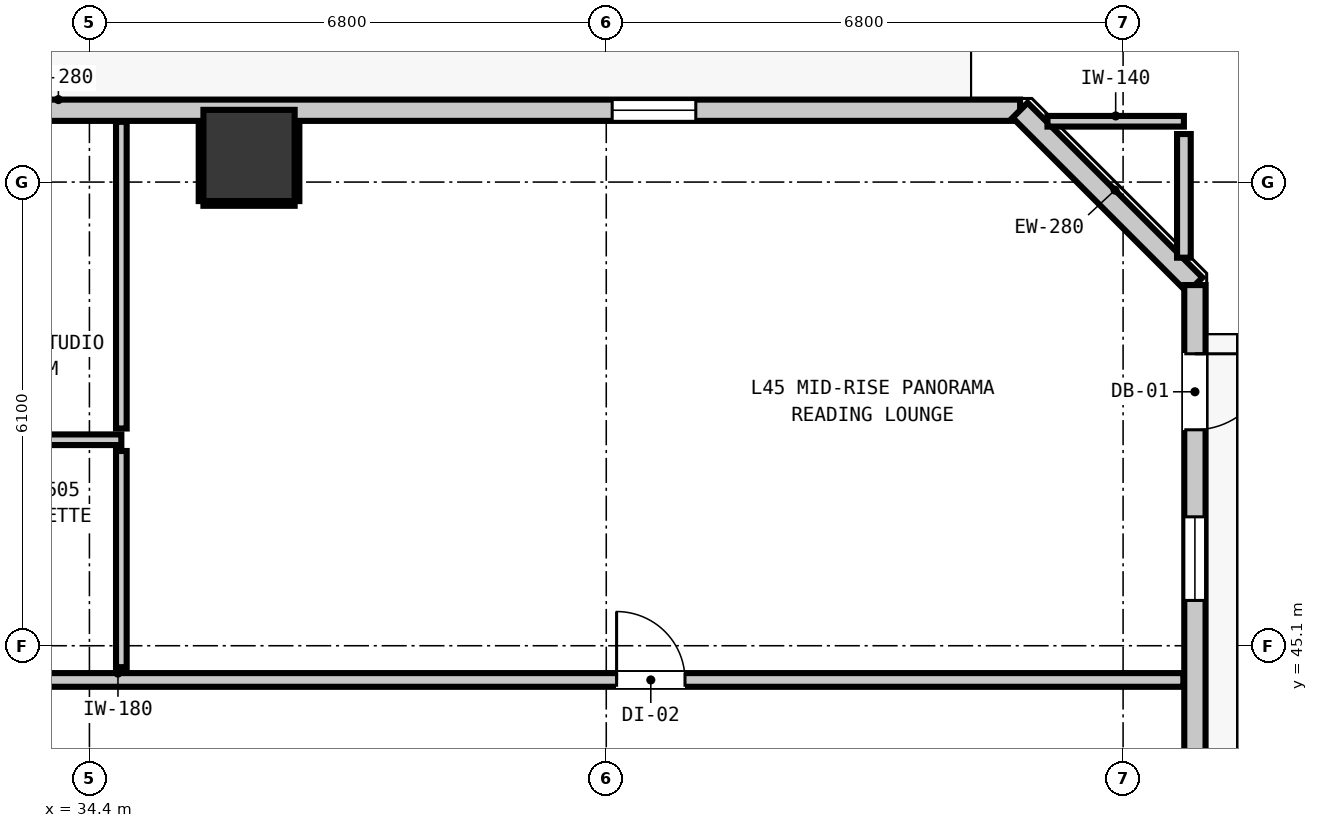
"""IFC4 building model, lengths in metres.
Left out: names, types, materials, properties, quantities, classifications, styles, units other than length and angle.
Written with IfcOpenShell. Run it as: python <this file> out.ifc"""

import sys

from ifc_helpers import new_model, si_unit, direction, frame, frame_2d, origin, origin_2d, place, context, subcontext, project, spatial, rectangle, extrude, element, fill, save


model = new_model("IFC4")
c1 = context("Model", 3, precision=1e-05, world=origin(), true_north=direction((0.0, 1.0)))
c2 = subcontext(c1, "Body", "Model", "MODEL_VIEW")
j1 = project(units=[si_unit("LENGTHUNIT", "METRE"), si_unit("PLANEANGLEUNIT", "RADIAN")], contexts=[c1])
p1 = place(None, origin())
s1 = spatial("IfcSite", under=j1, at=p1, CompositionType="ELEMENT")
p2 = place(p1, origin())
s2 = spatial("IfcBuilding", under=s1, at=p2, CompositionType="ELEMENT")
p3 = place(p2, frame((0.0, 0.0, 155.88)))
s3 = spatial("IfcBuildingStorey", under=s2, at=p3, CompositionType="ELEMENT", Elevation=155.88)
p4 = place(p3, frame((36.5, 51.55, 0.0), z_axis=(0.0, 0.0, 1.0), x_axis=(1.0, 0.0, 0.0)))
e1 = element("IfcColumn", 1, at=p4, inside=s3, PredefinedType="COLUMN", context=c2, shape_type="SweptSolid", body=[
    extrude(rectangle(XDim=1.2, YDim=1.2, at=origin_2d()), origin(), (0.0, 0.0, 1.0), 3.32),
])
p5 = place(p3, frame((11.555, 52.145, 0.0), z_axis=(0.0, 0.0, 1.0), x_axis=(1.0, 0.0, 0.0)))
e2 = element("IfcWall", 2, at=p5, inside=s3, PredefinedType="STANDARD", context=c2, shape_type="SweptSolid", body=[
    extrude(rectangle(XDim=35.09, YDim=0.28, at=frame_2d((17.545, 0.0))), origin(), (0.0, 0.0, 1.0), 3.08),
])
p6 = place(p5, frame((4.062, 0.0, 0.0)))
e3 = element("IfcOpeningElement", 3, at=p6, cuts=e2, PredefinedType="OPENING", context=c2, shape_type="SweptSolid", body=[
    extrude(rectangle(XDim=1.0, YDim=2.15, at=frame_2d((0.5, 1.075))), frame((0.0, 0.15, 0.0), z_axis=(0.0, -1.0, 0.0), x_axis=(1.0, 0.0, 0.0)), (0.0, 0.0, 1.0), 0.3),
])
p7 = place(p5, frame((5.863, 0.0, 0.85)))
e4 = element("IfcOpeningElement", 4, at=p7, cuts=e2, PredefinedType="OPENING", context=c2, shape_type="SweptSolid", body=[
    extrude(rectangle(XDim=1.1, YDim=2.05, at=frame_2d((0.55, 1.025))), frame((0.0, 0.15, 0.0), z_axis=(0.0, -1.0, 0.0), x_axis=(1.0, 0.0, 0.0)), (0.0, 0.0, 1.0), 0.3),
])
p8 = place(p5, frame((0.378, 0.0, 0.85)))
e5 = element("IfcOpeningElement", 5, at=p8, cuts=e2, PredefinedType="OPENING", context=c2, shape_type="SweptSolid", body=[
    extrude(rectangle(XDim=0.58, YDim=1.5, at=frame_2d((0.29, 0.75))), frame((0.0, 0.15, 0.0), z_axis=(0.0, -1.0, 0.0), x_axis=(1.0, 0.0, 0.0)), (0.0, 0.0, 1.0), 0.3),
])
p9 = place(p5, frame((14.05, 0.0, 0.85)))
e6 = element("IfcOpeningElement", 6, at=p9, cuts=e2, PredefinedType="OPENING", context=c2, shape_type="SweptSolid", body=[
    extrude(rectangle(XDim=1.1, YDim=2.05, at=frame_2d((0.55, 1.025))), frame((0.0, 0.15, 0.0), z_axis=(0.0, -1.0, 0.0), x_axis=(1.0, 0.0, 0.0)), (0.0, 0.0, 1.0), 0.3),
])
p10 = place(p5, frame((29.723, 0.0, 0.85)))
e7 = element("IfcOpeningElement", 7, at=p10, cuts=e2, PredefinedType="OPENING", context=c2, shape_type="SweptSolid", body=[
    extrude(rectangle(XDim=1.1, YDim=2.05, at=frame_2d((0.55, 1.025))), frame((0.0, 0.15, 0.0), z_axis=(0.0, -1.0, 0.0), x_axis=(1.0, 0.0, 0.0)), (0.0, 0.0, 1.0), 0.3),
])
p11 = place(p3, frame((46.645, 52.145, 0.0), z_axis=(0.0, 0.0, 1.0), x_axis=(0.707106781187, -0.707106781187, 0.0)))
e8 = element("IfcWall", 8, at=p11, inside=s3, PredefinedType="STANDARD", context=c2, shape_type="SweptSolid", body=[
    extrude(rectangle(XDim=3.253, YDim=0.28, at=frame_2d((1.626, 0.0))), origin(), (0.0, 0.0, 1.0), 3.08),
])
p12 = place(p3, frame((48.945, 49.845, 0.0), z_axis=(0.0, 0.0, 1.0), x_axis=(0.0, -1.0, 0.0)))
e9 = element("IfcWall", 9, at=p12, inside=s3, PredefinedType="STANDARD", context=c2, shape_type="SweptSolid", body=[
    extrude(rectangle(XDim=32.29, YDim=0.28, at=frame_2d((16.145, 0.0))), origin(), (0.0, 0.0, 1.0), 3.08),
])
p13 = place(p12, frame((0.904, 0.0, 0.0)))
e10 = element("IfcOpeningElement", 10, at=p13, cuts=e9, PredefinedType="OPENING", context=c2, shape_type="SweptSolid", body=[
    extrude(rectangle(XDim=1.0, YDim=2.15, at=frame_2d((0.5, 1.075))), frame((0.0, 0.15, 0.0), z_axis=(0.0, -1.0, 0.0), x_axis=(1.0, 0.0, 0.0)), (0.0, 0.0, 1.0), 0.3),
])
p14 = place(p12, frame((3.049, 0.0, 0.85)))
e11 = element("IfcOpeningElement", 11, at=p14, cuts=e9, PredefinedType="OPENING", context=c2, shape_type="SweptSolid", body=[
    extrude(rectangle(XDim=1.1, YDim=2.05, at=frame_2d((0.55, 1.025))), frame((0.0, 0.15, 0.0), z_axis=(0.0, -1.0, 0.0), x_axis=(1.0, 0.0, 0.0)), (0.0, 0.0, 1.0), 0.3),
])
p15 = place(p12, frame((21.311, 0.0, 0.85)))
e12 = element("IfcOpeningElement", 12, at=p15, cuts=e9, PredefinedType="OPENING", context=c2, shape_type="SweptSolid", body=[
    extrude(rectangle(XDim=1.1, YDim=2.05, at=frame_2d((0.55, 1.025))), frame((0.0, 0.15, 0.0), z_axis=(0.0, -1.0, 0.0), x_axis=(1.0, 0.0, 0.0)), (0.0, 0.0, 1.0), 0.3),
])
p16 = place(p12, frame((12.32, 0.0, 0.85)))
e13 = element("IfcOpeningElement", 13, at=p16, cuts=e9, PredefinedType="OPENING", context=c2, shape_type="SweptSolid", body=[
    extrude(rectangle(XDim=1.1, YDim=2.05, at=frame_2d((0.55, 1.025))), frame((0.0, 0.15, 0.0), z_axis=(0.0, -1.0, 0.0), x_axis=(1.0, 0.0, 0.0)), (0.0, 0.0, 1.0), 0.3),
])
p17 = place(p3, frame((9.407, 44.65, 0.0), z_axis=(0.0, 0.0, 1.0), x_axis=(1.0, 0.0, 0.0)))
e14 = element("IfcWall", 14, at=p17, inside=s3, PredefinedType="PARTITIONING", context=c2, shape_type="SweptSolid", body=[
    extrude(rectangle(XDim=39.386, YDim=0.18, at=frame_2d((19.693, 0.0))), origin(), (0.0, 0.0, 1.0), 3.08),
])
p18 = place(p17, frame((7.193, 0.0, 0.0)))
e15 = element("IfcOpeningElement", 15, at=p18, cuts=e14, PredefinedType="OPENING", context=c2, shape_type="SweptSolid", body=[
    extrude(rectangle(XDim=1.0, YDim=2.15, at=frame_2d((0.5, 1.075))), frame((0.0, 0.1, 0.0), z_axis=(0.0, -1.0, 0.0), x_axis=(1.0, 0.0, 0.0)), (0.0, 0.0, 1.0), 0.2),
])
p19 = place(p17, frame((17.808, 0.0, 0.0)))
e16 = element("IfcOpeningElement", 16, at=p19, cuts=e14, PredefinedType="OPENING", context=c2, shape_type="SweptSolid", body=[
    extrude(rectangle(XDim=1.0, YDim=2.15, at=frame_2d((0.5, 1.075))), frame((0.0, 0.1, 0.0), z_axis=(0.0, -1.0, 0.0), x_axis=(1.0, 0.0, 0.0)), (0.0, 0.0, 1.0), 0.2),
])
p20 = place(p17, frame((31.929, 0.0, 0.0)))
e17 = element("IfcOpeningElement", 17, at=p20, cuts=e14, PredefinedType="OPENING", context=c2, shape_type="SweptSolid", body=[
    extrude(rectangle(XDim=0.9, YDim=2.1, at=frame_2d((0.45, 1.05))), frame((0.0, 0.1, 0.0), z_axis=(0.0, -1.0, 0.0), x_axis=(1.0, 0.0, 0.0)), (0.0, 0.0, 1.0), 0.2),
])
p21 = place(p3, frame((31.82, 47.81, 0.0), z_axis=(0.0, 0.0, 1.0), x_axis=(1.0, 0.0, 0.0)))
e18 = element("IfcWall", 18, at=p21, inside=s3, PredefinedType="PARTITIONING", context=c2, shape_type="SweptSolid", body=[
    extrude(rectangle(XDim=3.0, YDim=0.14, at=frame_2d((1.5, 0.0))), origin(), (0.0, 0.0, 1.0), 3.08),
])
p22 = place(p3, frame((47.005, 52.0, 0.0), z_axis=(0.0, 0.0, 1.0), x_axis=(1.0, 0.0, 0.0)))
e19 = element("IfcWall", 19, at=p22, inside=s3, PredefinedType="PARTITIONING", context=c2, shape_type="SweptSolid", body=[
    extrude(rectangle(XDim=1.795, YDim=0.14, at=frame_2d((0.897, 0.0))), origin(), (0.0, 0.0, 1.0), 3.08),
])
p23 = place(p3, frame((48.8, 50.205, 0.0), z_axis=(0.0, 0.0, 1.0), x_axis=(0.0, 1.0, 0.0)))
e20 = element("IfcWall", 20, at=p23, inside=s3, PredefinedType="PARTITIONING", context=c2, shape_type="SweptSolid", body=[
    extrude(rectangle(XDim=1.627, YDim=0.18, at=frame_2d((0.813, 0.0))), origin(), (0.0, 0.0, 1.0), 3.08),
])
p24 = place(p3, frame((34.82, 44.818, 0.0), z_axis=(0.0, 0.0, 1.0), x_axis=(0.0, 1.0, 0.0)))
e21 = element("IfcWall", 21, at=p24, inside=s3, PredefinedType="PARTITIONING", context=c2, shape_type="SweptSolid", body=[
    extrude(rectangle(XDim=2.844, YDim=0.14, at=frame_2d((1.422, 0.0))), origin(), (0.0, 0.0, 1.0), 3.08),
])
p25 = place(p3, frame((34.82, 47.958, 0.0), z_axis=(0.0, 0.0, 1.0), x_axis=(0.0, 1.0, 0.0)))
e22 = element("IfcWall", 22, at=p25, inside=s3, PredefinedType="PARTITIONING", context=c2, shape_type="SweptSolid", body=[
    extrude(rectangle(XDim=4.035, YDim=0.14, at=frame_2d((2.018, 0.0))), origin(), (0.0, 0.0, 1.0), 3.08),
])
p26 = place(p3, frame((35.9, 50.918, 0.0), z_axis=(0.0, 0.0, 1.0), x_axis=(1.0, 0.0, 0.0)))
e23 = element("IfcWall", 23, at=p26, inside=s3, PredefinedType="PARTITIONING", context=c2, shape_type="SweptSolid", body=[
    extrude(rectangle(XDim=1.2, YDim=0.06, at=frame_2d((0.6, 0.0))), origin(), (0.0, 0.0, 1.0), 1.45),
])
for number, where, z_axis, x_axis in (
    (24, (35.868, 50.95, 0.0), (0.0, 0.0, 1.0), (0.0, 1.0, 0.0)),
    (25, (37.132, 50.95, 0.0), (0.0, 0.0, 1.0), (0.0, 1.0, 0.0)),
):
    element("IfcWall", number, at=place(p3, frame(where, z_axis=z_axis, x_axis=x_axis)), inside=s3, PredefinedType="PARTITIONING", context=c2, shape_type="SweptSolid", body=[
        extrude(rectangle(XDim=1.04, YDim=0.06, at=frame_2d((0.52, 0.0))), origin(), (0.0, 0.0, 1.0), 1.45),
    ])
p27 = place(p13, origin())
e26 = element("IfcDoor", 26, at=p27, inside=s3, OperationType="SINGLE_SWING_LEFT", PredefinedType="DOOR", context=c2, shape_type="SweptSolid", body=[
    extrude(rectangle(XDim=1.0, YDim=2.15, at=frame_2d((0.5, 1.075))), frame((0.0, 0.025, 0.0), z_axis=(0.0, -1.0, 0.0), x_axis=(1.0, 0.0, 0.0)), (0.0, 0.0, 1.0), 0.05),
])
fill(e10, e26)
p28 = place(p10, origin())
e27 = element("IfcWindow", 27, at=p28, inside=s3, PartitioningType="SINGLE_PANEL", PredefinedType="WINDOW", context=c2, shape_type="SweptSolid", body=[
    extrude(rectangle(XDim=1.1, YDim=2.05, at=frame_2d((0.55, 1.025))), frame((0.0, 0.03, 0.0), z_axis=(0.0, -1.0, 0.0), x_axis=(1.0, 0.0, 0.0)), (0.0, 0.0, 1.0), 0.06),
])
fill(e7, e27)
p29 = place(p14, origin())
e28 = element("IfcWindow", 28, at=p29, inside=s3, PartitioningType="SINGLE_PANEL", PredefinedType="WINDOW", context=c2, shape_type="SweptSolid", body=[
    extrude(rectangle(XDim=1.1, YDim=2.05, at=frame_2d((0.55, 1.025))), frame((0.0, 0.03, 0.0), z_axis=(0.0, -1.0, 0.0), x_axis=(1.0, 0.0, 0.0)), (0.0, 0.0, 1.0), 0.06),
])
fill(e11, e28)
p30 = place(p20, origin())
e29 = element("IfcDoor", 29, at=p30, inside=s3, OperationType="SINGLE_SWING_LEFT", PredefinedType="DOOR", context=c2, shape_type="SweptSolid", body=[
    extrude(rectangle(XDim=0.9, YDim=2.1, at=frame_2d((0.45, 1.05))), frame((0.0, 0.025, 0.0), z_axis=(0.0, -1.0, 0.0), x_axis=(1.0, 0.0, 0.0)), (0.0, 0.0, 1.0), 0.05),
])
fill(e17, e29)
save(model, sys.argv[1])
